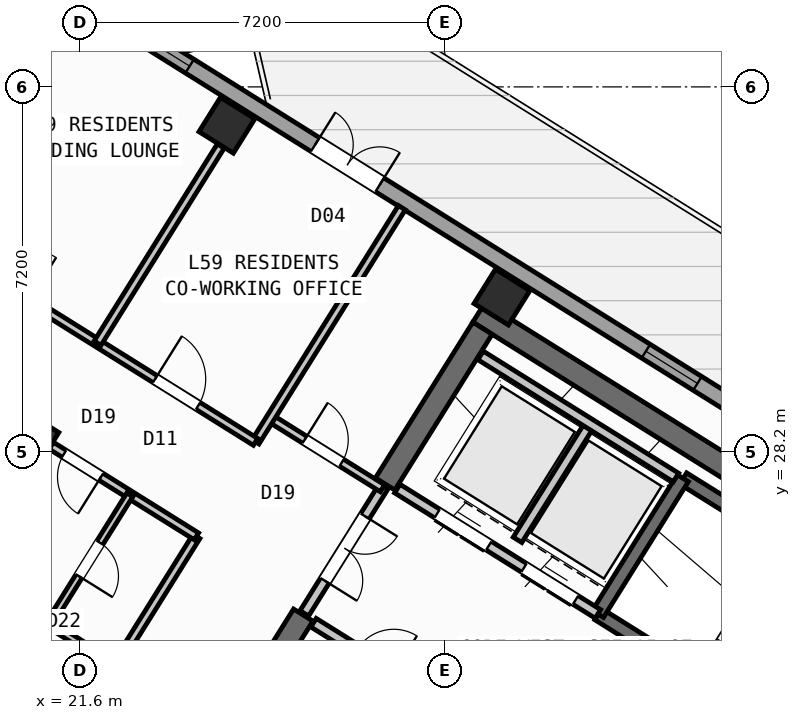
"""IFC4 building model, lengths in metres.
Left out: names, types, materials, properties, quantities, classifications, styles, units other than length and angle.
Written with IfcOpenShell. Run it as: python <this file> out.ifc"""

import sys

from ifc_helpers import new_model, si_unit, direction, frame, frame_2d, origin, origin_2d, place, context, subcontext, project, spatial, rectangle, hollow_rectangle, extrude, source, transform, mapped, element, fill, save


model = new_model("IFC4")
c1 = context("Model", 3, precision=1e-05, world=origin(), true_north=direction((0.0, 1.0)))
c2 = subcontext(c1, "Body", "Model", "MODEL_VIEW")
j1 = project(units=[si_unit("LENGTHUNIT", "METRE"), si_unit("PLANEANGLEUNIT", "RADIAN")], contexts=[c1])
p1 = place(None, origin())
s1 = spatial("IfcSite", under=j1, at=p1, CompositionType="ELEMENT")
p2 = place(p1, origin())
s2 = spatial("IfcBuilding", under=s1, at=p2, CompositionType="ELEMENT")
p3 = place(p2, frame((0.0, 0.0, 233.7)))
s3 = spatial("IfcBuildingStorey", under=s2, at=p3, CompositionType="ELEMENT", Elevation=233.7)
p4 = place(p3, frame((40.531, 24.036, 0.0), z_axis=(0.0, 0.0, 1.0), x_axis=(-0.848048787466, 0.529918157905, 0.0)))
e1 = element("IfcWall", 1, at=p4, inside=s3, PredefinedType="SHEAR", context=c2, shape_type="SweptSolid", body=[
    extrude(rectangle(XDim=13.04, YDim=0.45, at=frame_2d((6.52, 0.0))), origin(), (0.0, 0.0, 1.0), 4.55),
])
p5 = place(p3, frame((29.544, 30.636, 0.0), z_axis=(0.0, 0.0, 1.0), x_axis=(-0.529902075036, -0.848058836916, 0.0)))
e2 = element("IfcWall", 2, at=p5, inside=s3, PredefinedType="SHEAR", context=c2, shape_type="SweptSolid", body=[
    extrude(rectangle(XDim=3.625, YDim=0.45, at=frame_2d((1.812, 0.0))), origin(), (0.0, 0.0, 1.0), 4.55),
])
p6 = place(p3, frame((26.007, 24.976, 0.0), z_axis=(0.0, 0.0, 1.0), x_axis=(-0.529931155655, -0.848040665456, 0.0)))
e3 = element("IfcWall", 3, at=p6, inside=s3, PredefinedType="SHEAR", context=c2, shape_type="SweptSolid", body=[
    extrude(rectangle(XDim=6.475, YDim=0.45, at=frame_2d((3.238, 0.0))), origin(), (0.0, 0.0, 1.0), 4.55),
])
m1 = source(origin(), c2, "Body", "SweptSolid", [
    extrude(hollow_rectangle(XDim=0.8, YDim=0.8, WallThickness=0.032, at=origin_2d()), origin(), (0.0, 0.0, 1.0), 4.8),
])
for number, where, z_axis, x_axis in (
    (4, (29.928, 31.251, 0.0), (0.0, 0.0, 1.0), (-0.848, 0.53, 0.0)),
    (5, (24.5, 34.643, 0.0), (0.0, 0.0, 1.0), (-0.848, 0.53, 0.0)),
    (6, (20.632, 28.452, 0.0), (0.0, 0.0, 1.0), (-0.848, 0.53, 0.0)),
):
    element("IfcColumn", number, at=place(p3, frame(where, z_axis=z_axis, x_axis=x_axis)), inside=s3, PredefinedType="COLUMN", context=c2, shape_type="MappedRepresentation", body=[
        mapped(m1, transform((0.0, 0.0, 0.0), scale=1.0)),
    ])
p7 = place(p3, frame((14.138, 41.825, 0.0), z_axis=(0.0, 0.0, 1.0), x_axis=(0.848046498049, -0.529921821731, 0.0)))
e7 = element("IfcWall", 7, at=p7, inside=s3, PredefinedType="STANDARD", context=c2, shape_type="SweptSolid", body=[
    extrude(rectangle(XDim=31.588, YDim=0.32, at=frame_2d((15.794, 0.0))), origin(), (0.0, 0.0, 1.0), 4.55),
])
p8 = place(p7, frame((2.526, 0.0, 0.0)))
e8 = element("IfcOpeningElement", 8, at=p8, cuts=e7, PredefinedType="OPENING", context=c2, shape_type="SweptSolid", body=[
    extrude(rectangle(XDim=1.05, YDim=2.15, at=frame_2d((0.525, 1.075))), frame((0.0, 0.17, 0.0), z_axis=(0.0, -1.0, 0.0), x_axis=(1.0, 0.0, 0.0)), (0.0, 0.0, 1.0), 0.34),
])
p9 = place(p7, frame((14.274, 0.0, 0.0)))
e9 = element("IfcOpeningElement", 9, at=p9, cuts=e7, PredefinedType="OPENING", context=c2, shape_type="SweptSolid", body=[
    extrude(rectangle(XDim=1.5, YDim=2.25, at=frame_2d((0.75, 1.125))), frame((0.0, 0.17, 0.0), z_axis=(0.0, -1.0, 0.0), x_axis=(1.0, 0.0, 0.0)), (0.0, 0.0, 1.0), 0.34),
])
p10 = place(p7, frame((0.775, 0.0, 0.95)))
e10 = element("IfcOpeningElement", 10, at=p10, cuts=e7, PredefinedType="OPENING", context=c2, shape_type="SweptSolid", body=[
    extrude(rectangle(XDim=1.2, YDim=1.4, at=frame_2d((0.6, 0.7))), frame((0.0, 0.17, 0.0), z_axis=(0.0, -1.0, 0.0), x_axis=(1.0, 0.0, 0.0)), (0.0, 0.0, 1.0), 0.34),
])
p11 = place(p7, frame((9.552, 0.0, 0.85)))
e11 = element("IfcOpeningElement", 11, at=p11, cuts=e7, PredefinedType="OPENING", context=c2, shape_type="SweptSolid", body=[
    extrude(rectangle(XDim=1.8, YDim=1.5, at=frame_2d((0.9, 0.75))), frame((0.0, 0.17, 0.0), z_axis=(0.0, -1.0, 0.0), x_axis=(1.0, 0.0, 0.0)), (0.0, 0.0, 1.0), 0.34),
])
p12 = place(p7, frame((21.969, 0.0, 0.95)))
e12 = element("IfcOpeningElement", 12, at=p12, cuts=e7, PredefinedType="OPENING", context=c2, shape_type="SweptSolid", body=[
    extrude(rectangle(XDim=1.2, YDim=1.4, at=frame_2d((0.6, 0.7))), frame((0.0, 0.17, 0.0), z_axis=(0.0, -1.0, 0.0), x_axis=(1.0, 0.0, 0.0)), (0.0, 0.0, 1.0), 0.34),
])
p13 = place(p7, frame((27.619, 0.0, 0.95)))
e13 = element("IfcOpeningElement", 13, at=p13, cuts=e7, PredefinedType="OPENING", context=c2, shape_type="SweptSolid", body=[
    extrude(rectangle(XDim=1.2, YDim=1.4, at=frame_2d((0.6, 0.7))), frame((0.0, 0.17, 0.0), z_axis=(0.0, -1.0, 0.0), x_axis=(1.0, 0.0, 0.0)), (0.0, 0.0, 1.0), 0.34),
])
p14 = place(p3, frame((39.721, 23.788, 0.0), z_axis=(0.0, 0.0, 1.0), x_axis=(-0.848054434086, 0.529909121291, 0.0)))
e14 = element("IfcWall", 14, at=p14, inside=s3, PredefinedType="SHEAR", context=c2, shape_type="SweptSolid", body=[
    extrude(rectangle(XDim=7.33, YDim=0.26, at=frame_2d((3.665, 0.0))), origin(), (0.0, 0.0, 1.0), 4.55),
])
p15 = place(p3, frame((38.046, 21.108, 0.0), z_axis=(0.0, 0.0, 1.0), x_axis=(-0.848054434086, 0.529909121291, 0.0)))
e15 = element("IfcWall", 15, at=p15, inside=s3, PredefinedType="SHEAR", context=c2, shape_type="SweptSolid", body=[
    extrude(rectangle(XDim=7.33, YDim=0.26, at=frame_2d((3.665, 0.0))), origin(), (0.0, 0.0, 1.0), 4.55),
])
p16 = place(p15, frame((0.22, 0.0, 0.0)))
e16 = element("IfcOpeningElement", 16, at=p16, cuts=e15, PredefinedType="OPENING", context=c2, shape_type="SweptSolid", body=[
    extrude(rectangle(XDim=1.1, YDim=2.1, at=frame_2d((0.55, 1.05))), frame((0.0, 0.14, 0.0), z_axis=(0.0, -1.0, 0.0), x_axis=(1.0, 0.0, 0.0)), (0.0, 0.0, 1.0), 0.28),
])
p17 = place(p3, frame((33.496, 27.677, 0.0), z_axis=(0.0, 0.0, 1.0), x_axis=(-0.529908658664, -0.84805472316, 0.0)))
e17 = element("IfcWall", 17, at=p17, inside=s3, PredefinedType="SHEAR", context=c2, shape_type="SweptSolid", body=[
    extrude(rectangle(XDim=3.16, YDim=0.26, at=frame_2d((1.58, 0.0))), origin(), (0.0, 0.0, 1.0), 4.55),
])
p18 = place(p3, frame((31.822, 24.998, 0.0), z_axis=(0.0, 0.0, 1.0), x_axis=(-0.848054125777, 0.529909614701, 0.0)))
e18 = element("IfcWall", 18, at=p18, inside=s3, PredefinedType="STANDARD", context=c2, shape_type="SweptSolid", body=[
    extrude(rectangle(XDim=4.668, YDim=0.2, at=frame_2d((2.334, 0.0))), origin(), (0.0, 0.0, 1.0), 4.54),
])
p19 = place(p18, frame((0.52, 0.0, 0.0)))
e19 = element("IfcOpeningElement", 19, at=p19, cuts=e18, PredefinedType="OPENING", context=c2, shape_type="SweptSolid", body=[
    extrude(rectangle(XDim=1.2, YDim=2.15, at=frame_2d((0.6, 1.075))), frame((0.0, 0.11, 0.0), z_axis=(0.0, -1.0, 0.0), x_axis=(1.0, 0.0, 0.0)), (0.0, 0.0, 1.0), 0.22),
])
p20 = place(p18, frame((2.54, 0.0, 0.0)))
e20 = element("IfcOpeningElement", 20, at=p20, cuts=e18, PredefinedType="OPENING", context=c2, shape_type="SweptSolid", body=[
    extrude(rectangle(XDim=1.2, YDim=2.15, at=frame_2d((0.6, 1.075))), frame((0.0, 0.11, 0.0), z_axis=(0.0, -1.0, 0.0), x_axis=(1.0, 0.0, 0.0)), (0.0, 0.0, 1.0), 0.22),
])
p21 = place(p3, frame((31.645, 28.716, 0.0), z_axis=(0.0, 0.0, 1.0), x_axis=(-0.52986693015, -0.848080795876, 0.0)))
e21 = element("IfcWall", 21, at=p21, inside=s3, PredefinedType="STANDARD", context=c2, shape_type="SweptSolid", body=[
    extrude(rectangle(XDim=2.66, YDim=0.2, at=frame_2d((1.33, 0.0))), origin(), (0.0, 0.0, 1.0), 4.54),
])
p22 = place(p3, frame((33.363, 27.69, 0.0), z_axis=(0.0, 0.0, 1.0), x_axis=(-0.84804957148, 0.529916903215, 0.0)))
e22 = element("IfcWall", 22, at=p22, inside=s3, PredefinedType="STANDARD", context=c2, shape_type="SweptSolid", body=[
    extrude(rectangle(XDim=4.548, YDim=0.2, at=frame_2d((2.274, 0.0))), origin(), (0.0, 0.0, 1.0), 4.54),
])
p23 = place(p3, frame((31.525, 21.504, 0.0), z_axis=(0.0, 0.0, 1.0), x_axis=(-0.848042066329, 0.529928913853, 0.0)))
e23 = element("IfcWall", 23, at=p23, inside=s3, PredefinedType="STANDARD", context=c2, shape_type="SweptSolid", body=[
    extrude(rectangle(XDim=6.268, YDim=0.2, at=frame_2d((3.134, 0.0))), origin(), (0.0, 0.0, 1.0), 4.54),
])
p24 = place(p23, frame((4.4, 0.0, 0.0)))
e24 = element("IfcOpeningElement", 24, at=p24, cuts=e23, PredefinedType="OPENING", context=c2, shape_type="SweptSolid", body=[
    extrude(rectangle(XDim=0.86, YDim=2.05, at=frame_2d((0.43, 1.025))), frame((0.0, 0.11, 0.0), z_axis=(0.0, -1.0, 0.0), x_axis=(1.0, 0.0, 0.0)), (0.0, 0.0, 1.0), 0.22),
])
p25 = place(p23, frame((1.45, 0.0, 0.0)))
e25 = element("IfcOpeningElement", 25, at=p25, cuts=e23, PredefinedType="OPENING", context=c2, shape_type="SweptSolid", body=[
    extrude(rectangle(XDim=0.86, YDim=2.05, at=frame_2d((0.43, 1.025))), frame((0.0, 0.11, 0.0), z_axis=(0.0, -1.0, 0.0), x_axis=(1.0, 0.0, 0.0)), (0.0, 0.0, 1.0), 0.22),
])
p26 = place(p3, frame((27.596, 27.52, 0.0), z_axis=(0.0, 0.0, 1.0), x_axis=(-0.529865479138, -0.848081702443, 0.0)))
e26 = element("IfcWall", 26, at=p26, inside=s3, PredefinedType="STANDARD", context=c2, shape_type="SweptSolid", body=[
    extrude(rectangle(XDim=2.96, YDim=0.2, at=frame_2d((1.48, 0.0))), origin(), (0.0, 0.0, 1.0), 4.54),
])
p27 = place(p26, frame((0.7, 0.0, 0.0)))
e27 = element("IfcOpeningElement", 27, at=p27, cuts=e26, PredefinedType="OPENING", context=c2, shape_type="SweptSolid", body=[
    extrude(rectangle(XDim=1.5, YDim=2.15, at=frame_2d((0.75, 1.075))), frame((0.0, 0.11, 0.0), z_axis=(0.0, -1.0, 0.0), x_axis=(1.0, 0.0, 0.0)), (0.0, 0.0, 1.0), 0.22),
])
p28 = place(p3, frame((27.57, 27.478, 0.0), z_axis=(0.0, 0.0, 1.0), x_axis=(-0.848050851465, 0.529914854792, 0.0)))
e28 = element("IfcWall", 28, at=p28, inside=s3, PredefinedType="PARTITIONING", context=c2, shape_type="SweptSolid", body=[
    extrude(rectangle(XDim=2.61, YDim=0.16, at=frame_2d((1.305, 0.0))), origin(), (0.0, 0.0, 1.0), 4.54),
])
p29 = place(p28, frame((0.95, 0.0, 0.0)))
e29 = element("IfcOpeningElement", 29, at=p29, cuts=e28, PredefinedType="OPENING", context=c2, shape_type="SweptSolid", body=[
    extrude(rectangle(XDim=0.86, YDim=2.05, at=frame_2d((0.43, 1.025))), frame((0.0, 0.09, 0.0), z_axis=(0.0, -1.0, 0.0), x_axis=(1.0, 0.0, 0.0)), (0.0, 0.0, 1.0), 0.18),
])
p30 = place(p3, frame((27.953, 33.016, 0.0), z_axis=(0.0, 0.0, 1.0), x_axis=(-0.529906322364, -0.848056182997, 0.0)))
e30 = element("IfcWall", 30, at=p30, inside=s3, PredefinedType="PARTITIONING", context=c2, shape_type="SweptSolid", body=[
    extrude(rectangle(XDim=5.45, YDim=0.16, at=frame_2d((2.725, 0.0))), origin(), (0.0, 0.0, 1.0), 4.54),
])
p31 = place(p3, frame((23.899, 26.529, 0.0), z_axis=(0.0, 0.0, 1.0), x_axis=(-0.529917716469, -0.848049063305, 0.0)))
e31 = element("IfcWall", 31, at=p31, inside=s3, PredefinedType="PARTITIONING", context=c2, shape_type="SweptSolid", body=[
    extrude(rectangle(XDim=14.05, YDim=0.16, at=frame_2d((7.025, 0.0))), origin(), (0.0, 0.0, 1.0), 4.54),
])
p32 = place(p3, frame((25.065, 28.394, 0.0), z_axis=(0.0, 0.0, 1.0), x_axis=(-0.848048310262, 0.529918921593, 0.0)))
e32 = element("IfcWall", 32, at=p32, inside=s3, PredefinedType="PARTITIONING", context=c2, shape_type="SweptSolid", body=[
    extrude(rectangle(XDim=16.73, YDim=0.16, at=frame_2d((8.365, 0.0))), origin(), (0.0, 0.0, 1.0), 4.54),
])
p33 = place(p32, frame((1.338, 0.0, 0.0)))
e33 = element("IfcOpeningElement", 33, at=p33, cuts=e32, PredefinedType="OPENING", context=c2, shape_type="SweptSolid", body=[
    extrude(rectangle(XDim=1.0, YDim=2.1, at=frame_2d((0.5, 1.05))), frame((0.0, 0.09, 0.0), z_axis=(0.0, -1.0, 0.0), x_axis=(1.0, 0.0, 0.0)), (0.0, 0.0, 1.0), 0.18),
])
p34 = place(p32, frame((5.265, 0.0, 0.0)))
e34 = element("IfcOpeningElement", 34, at=p34, cuts=e32, PredefinedType="OPENING", context=c2, shape_type="SweptSolid", body=[
    extrude(rectangle(XDim=1.0, YDim=2.1, at=frame_2d((0.5, 1.05))), frame((0.0, 0.09, 0.0), z_axis=(0.0, -1.0, 0.0), x_axis=(1.0, 0.0, 0.0)), (0.0, 0.0, 1.0), 0.18),
])
p35 = place(p32, frame((9.526, 0.0, 0.0)))
e35 = element("IfcOpeningElement", 35, at=p35, cuts=e32, PredefinedType="OPENING", context=c2, shape_type="SweptSolid", body=[
    extrude(rectangle(XDim=1.0, YDim=2.1, at=frame_2d((0.5, 1.05))), frame((0.0, 0.09, 0.0), z_axis=(0.0, -1.0, 0.0), x_axis=(1.0, 0.0, 0.0)), (0.0, 0.0, 1.0), 0.18),
])
p36 = place(p32, frame((13.954, 0.0, 0.0)))
e36 = element("IfcOpeningElement", 36, at=p36, cuts=e32, PredefinedType="OPENING", context=c2, shape_type="SweptSolid", body=[
    extrude(rectangle(XDim=1.0, YDim=2.1, at=frame_2d((0.5, 1.05))), frame((0.0, 0.09, 0.0), z_axis=(0.0, -1.0, 0.0), x_axis=(1.0, 0.0, 0.0)), (0.0, 0.0, 1.0), 0.18),
])
p37 = place(p3, frame((23.899, 26.529, 0.0), z_axis=(0.0, 0.0, 1.0), x_axis=(-0.848055143312, 0.529907986259, 0.0)))
e37 = element("IfcWall", 37, at=p37, inside=s3, PredefinedType="PARTITIONING", context=c2, shape_type="SweptSolid", body=[
    extrude(rectangle(XDim=3.378, YDim=0.16, at=frame_2d((1.689, 0.0))), origin(), (0.0, 0.0, 1.0), 4.075),
])
p38 = place(p37, frame((2.22, 0.0, 0.0)))
e38 = element("IfcOpeningElement", 38, at=p38, cuts=e37, PredefinedType="OPENING", context=c2, shape_type="SweptSolid", body=[
    extrude(rectangle(XDim=0.86, YDim=2.05, at=frame_2d((0.43, 1.025))), frame((0.0, 0.09, 0.0), z_axis=(0.0, -1.0, 0.0), x_axis=(1.0, 0.0, 0.0)), (0.0, 0.0, 1.0), 0.18),
])
p39 = place(p3, frame((22.304, 23.976, 0.0), z_axis=(0.0, 0.0, 1.0), x_axis=(-0.84803087207, 0.529946827537, 0.0)))
e39 = element("IfcWall", 39, at=p39, inside=s3, PredefinedType="PLUMBINGWALL", context=c2, shape_type="SweptSolid", body=[
    extrude(rectangle(XDim=3.79, YDim=0.14, at=frame_2d((1.895, 0.0))), origin(), (0.0, 0.0, 1.0), 4.54),
])
p40 = place(p39, frame((2.23, 0.0, 0.0)))
e40 = element("IfcOpeningElement", 40, at=p40, cuts=e39, PredefinedType="OPENING", context=c2, shape_type="SweptSolid", body=[
    extrude(rectangle(XDim=0.92, YDim=2.08, at=frame_2d((0.46, 1.04))), frame((0.0, 0.08, 0.0), z_axis=(0.0, -1.0, 0.0), x_axis=(1.0, 0.0, 0.0)), (0.0, 0.0, 1.0), 0.16),
])
p41 = place(p3, frame((22.585, 27.35, 0.0), z_axis=(0.0, 0.0, 1.0), x_axis=(-0.529977067289, -0.848011974059, 0.0)))
e41 = element("IfcWall", 41, at=p41, inside=s3, PredefinedType="PLUMBINGWALL", context=c2, shape_type="SweptSolid", body=[
    extrude(rectangle(XDim=3.01, YDim=0.14, at=frame_2d((1.505, 0.0))), origin(), (0.0, 0.0, 1.0), 4.225),
])
p42 = place(p41, frame((1.115, 0.0, 0.0)))
e42 = element("IfcOpeningElement", 42, at=p42, cuts=e41, PredefinedType="OPENING", context=c2, shape_type="SweptSolid", body=[
    extrude(rectangle(XDim=0.78, YDim=2.05, at=frame_2d((0.39, 1.025))), frame((0.0, 0.08, 0.0), z_axis=(0.0, -1.0, 0.0), x_axis=(1.0, 0.0, 0.0)), (0.0, 0.0, 1.0), 0.16),
])
p43 = place(p3, frame((24.379, 34.233, 0.0), z_axis=(0.0, 0.0, 1.0), x_axis=(-0.529922402838, -0.84804613493, 0.0)))
e43 = element("IfcWall", 43, at=p43, inside=s3, PredefinedType="PARTITIONING", context=c2, shape_type="SweptSolid", body=[
    extrude(rectangle(XDim=4.588, YDim=0.16, at=frame_2d((2.294, 0.0))), origin(), (0.0, 0.0, 1.0), 4.075),
])
p44 = place(p3, frame((21.292, 37.178, 0.0), z_axis=(0.0, 0.0, 1.0), x_axis=(-0.529938539346, -0.848036051425, 0.0)))
e44 = element("IfcWall", 44, at=p44, inside=s3, PredefinedType="PARTITIONING", context=c2, shape_type="SweptSolid", body=[
    extrude(rectangle(XDim=5.45, YDim=0.16, at=frame_2d((2.725, 0.0))), origin(), (0.0, 0.0, 1.0), 4.225),
])
m2 = source(origin(), c2, "Body", "SweptSolid", [
    extrude(rectangle(XDim=1.5, YDim=2.25, at=frame_2d((0.75, 1.125))), frame((0.0, 0.025, 0.0), z_axis=(0.0, -1.0, 0.0), x_axis=(1.0, 0.0, 0.0)), (0.0, 0.0, 1.0), 0.05),
])
p45 = place(p9, origin())
e45 = element("IfcDoor", 45, at=p45, inside=s3, OperationType="DOUBLE_DOOR_SINGLE_SWING", PredefinedType="DOOR", context=c2, shape_type="MappedRepresentation", body=[
    mapped(m2, transform((0.0, 0.0, 0.0), scale=1.0)),
])
fill(e9, e45)
m3 = source(origin(), c2, "Body", "SweptSolid", [
    extrude(rectangle(XDim=1.8, YDim=1.5, at=frame_2d((0.9, 0.75))), frame((0.0, 0.03, 0.0), z_axis=(0.0, -1.0, 0.0), x_axis=(1.0, 0.0, 0.0)), (0.0, 0.0, 1.0), 0.06),
])
p46 = place(p11, origin())
e46 = element("IfcWindow", 46, at=p46, inside=s3, PartitioningType="SINGLE_PANEL", PredefinedType="WINDOW", context=c2, shape_type="MappedRepresentation", body=[
    mapped(m3, transform((0.0, 0.0, 0.0), scale=1.0)),
])
fill(e11, e46)
m4 = source(origin(), c2, "Body", "SweptSolid", [
    extrude(rectangle(XDim=1.2, YDim=1.4, at=frame_2d((0.6, 0.7))), frame((0.0, 0.03, 0.0), z_axis=(0.0, -1.0, 0.0), x_axis=(1.0, 0.0, 0.0)), (0.0, 0.0, 1.0), 0.06),
])
p47 = place(p12, origin())
e47 = element("IfcWindow", 47, at=p47, inside=s3, PartitioningType="SINGLE_PANEL", PredefinedType="WINDOW", context=c2, shape_type="MappedRepresentation", body=[
    mapped(m4, transform((0.0, 0.0, 0.0), scale=1.0)),
])
fill(e12, e47)
m5 = source(origin(), c2, "Body", "SweptSolid", [
    extrude(rectangle(XDim=1.2, YDim=2.15, at=frame_2d((0.6, 1.075))), frame((0.0, 0.025, 0.0), z_axis=(0.0, -1.0, 0.0), x_axis=(1.0, 0.0, 0.0)), (0.0, 0.0, 1.0), 0.05),
])
p48 = place(p19, origin())
e48 = element("IfcDoor", 48, at=p48, inside=s3, OperationType="DOUBLE_DOOR_SLIDING", PredefinedType="DOOR", context=c2, shape_type="MappedRepresentation", body=[
    mapped(m5, transform((0.0, 0.0, 0.0), scale=1.0)),
])
fill(e19, e48)
p49 = place(p20, origin())
e49 = element("IfcDoor", 49, at=p49, inside=s3, OperationType="DOUBLE_DOOR_SLIDING", PredefinedType="DOOR", context=c2, shape_type="MappedRepresentation", body=[
    mapped(m5, transform((0.0, 0.0, 0.0), scale=1.0)),
])
fill(e20, e49)
m6 = source(origin(), c2, "Body", "SweptSolid", [
    extrude(rectangle(XDim=0.86, YDim=2.05, at=frame_2d((0.43, 1.025))), frame((0.0, 0.025, 0.0), z_axis=(0.0, -1.0, 0.0), x_axis=(1.0, 0.0, 0.0)), (0.0, 0.0, 1.0), 0.05),
])
p50 = place(p29, frame((0.86, 0.0, 0.0), z_axis=(0.0, 0.0, 1.0), x_axis=(-1.0, 0.0, 0.0)))
e50 = element("IfcDoor", 50, at=p50, inside=s3, OperationType="SINGLE_SWING_LEFT", PredefinedType="DOOR", context=c2, shape_type="MappedRepresentation", body=[
    mapped(m6, transform((0.0, 0.0, 0.0), scale=1.0)),
])
fill(e29, e50)
m7 = source(origin(), c2, "Body", "SweptSolid", [
    extrude(rectangle(XDim=1.5, YDim=2.15, at=frame_2d((0.75, 1.075))), frame((0.0, 0.025, 0.0), z_axis=(0.0, -1.0, 0.0), x_axis=(1.0, 0.0, 0.0)), (0.0, 0.0, 1.0), 0.05),
])
p51 = place(p27, origin())
e51 = element("IfcDoor", 51, at=p51, inside=s3, OperationType="DOUBLE_DOOR_SINGLE_SWING", PredefinedType="DOOR", context=c2, shape_type="MappedRepresentation", body=[
    mapped(m7, transform((0.0, 0.0, 0.0), scale=1.0)),
])
fill(e27, e51)
p52 = place(p38, origin())
e52 = element("IfcDoor", 52, at=p52, inside=s3, OperationType="SINGLE_SWING_LEFT", PredefinedType="DOOR", context=c2, shape_type="MappedRepresentation", body=[
    mapped(m6, transform((0.0, 0.0, 0.0), scale=1.0)),
])
fill(e38, e52)
m8 = source(origin(), c2, "Body", "SweptSolid", [
    extrude(rectangle(XDim=0.78, YDim=2.05, at=frame_2d((0.39, 1.025))), frame((0.0, 0.025, 0.0), z_axis=(0.0, -1.0, 0.0), x_axis=(1.0, 0.0, 0.0)), (0.0, 0.0, 1.0), 0.05),
])
p53 = place(p42, origin())
e53 = element("IfcDoor", 53, at=p53, inside=s3, OperationType="SINGLE_SWING_RIGHT", PredefinedType="DOOR", context=c2, shape_type="MappedRepresentation", body=[
    mapped(m8, transform((0.0, 0.0, 0.0), scale=1.0)),
])
fill(e42, e53)
m9 = source(origin(), c2, "Body", "SweptSolid", [
    extrude(rectangle(XDim=1.0, YDim=2.1, at=frame_2d((0.5, 1.05))), frame((0.0, 0.025, 0.0), z_axis=(0.0, -1.0, 0.0), x_axis=(1.0, 0.0, 0.0)), (0.0, 0.0, 1.0), 0.05),
])
p54 = place(p33, frame((1.0, 0.0, 0.0), z_axis=(0.0, 0.0, 1.0), x_axis=(-1.0, 0.0, 0.0)))
e54 = element("IfcDoor", 54, at=p54, inside=s3, OperationType="SINGLE_SWING_LEFT", PredefinedType="DOOR", context=c2, shape_type="MappedRepresentation", body=[
    mapped(m9, transform((0.0, 0.0, 0.0), scale=1.0)),
])
fill(e33, e54)
save(model, sys.argv[1])
